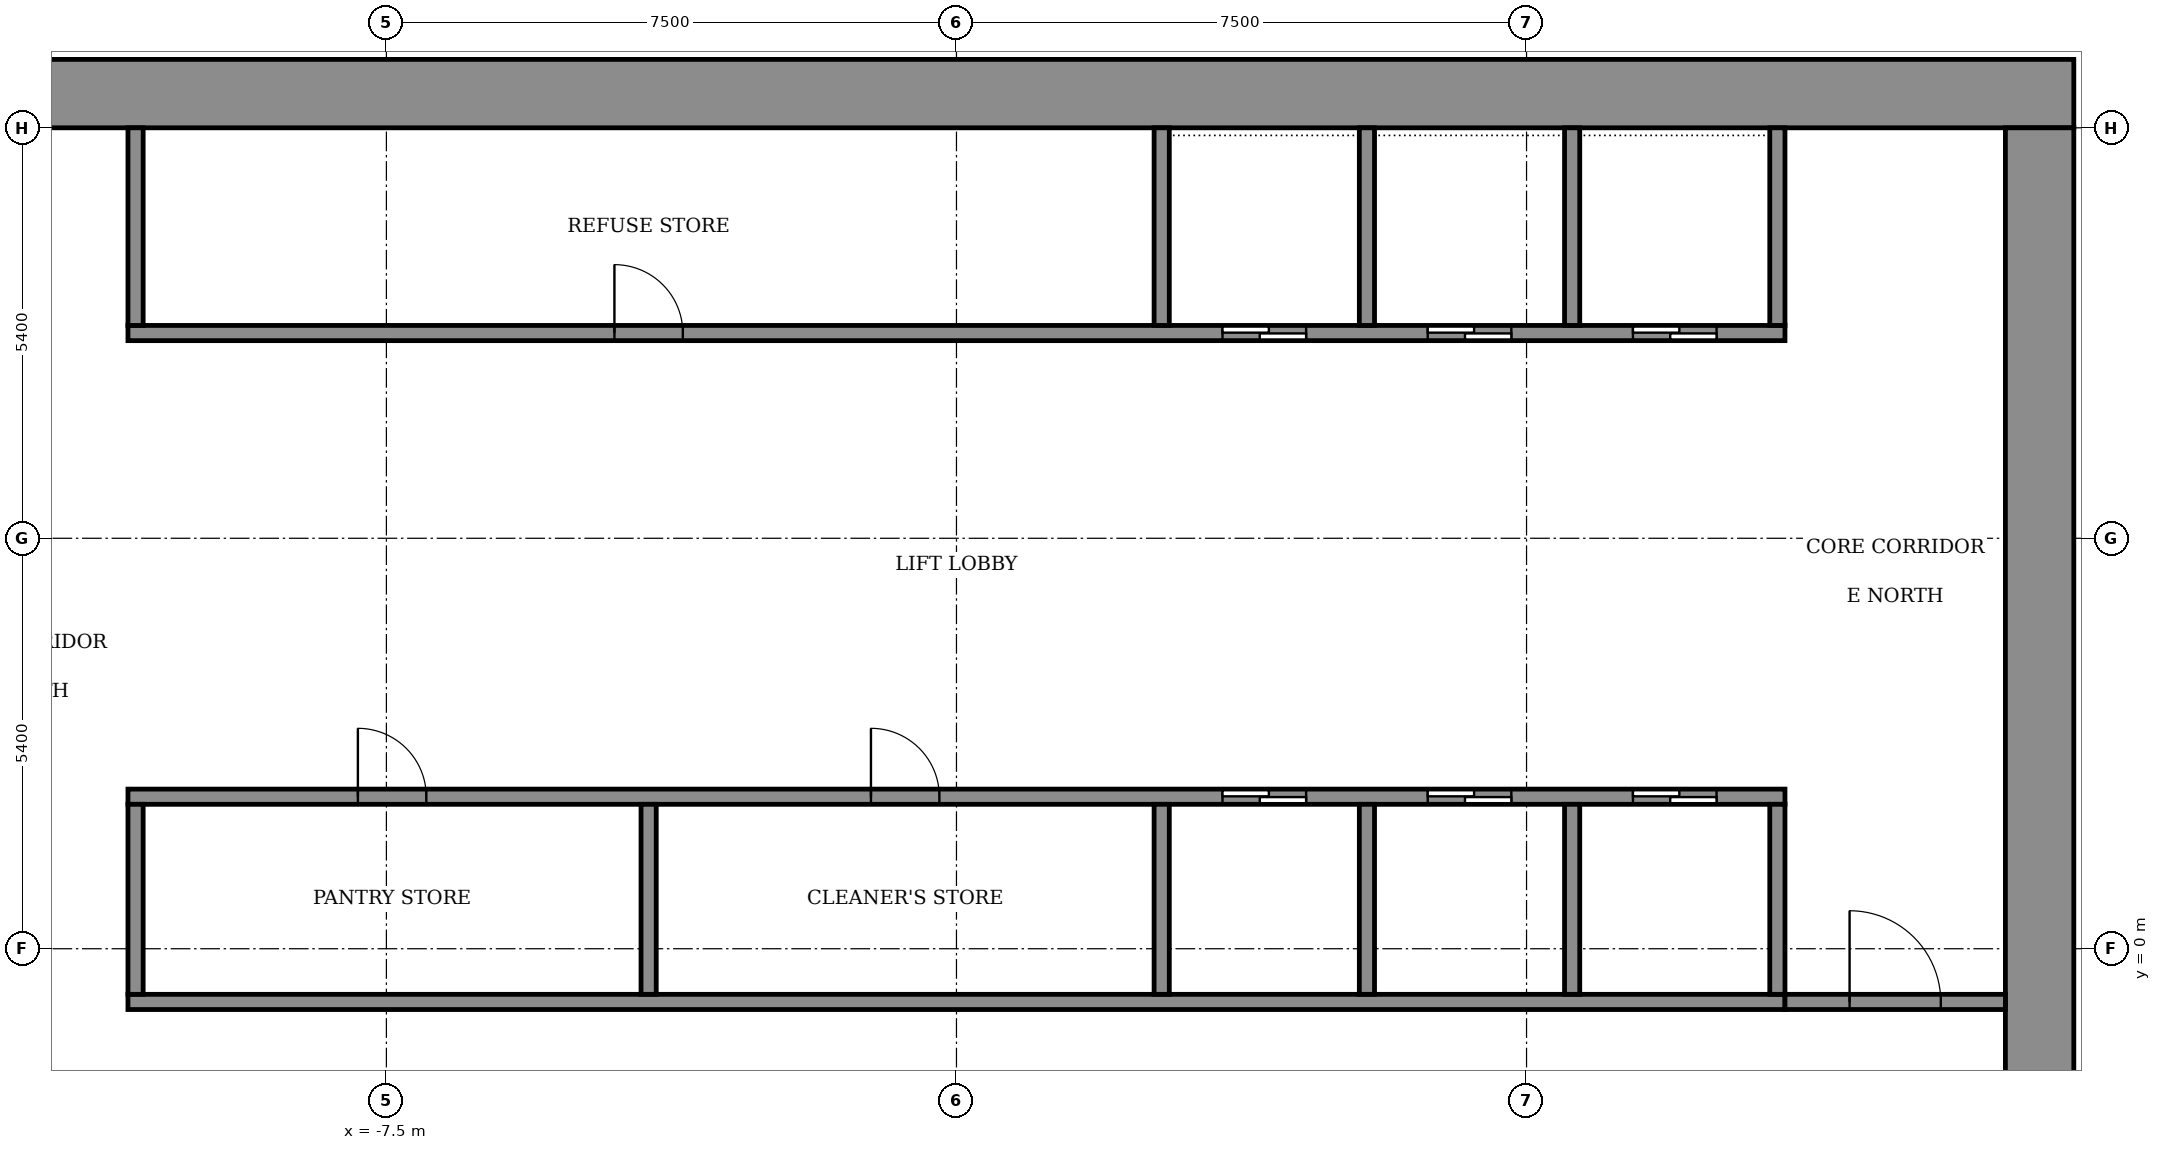
"""IFC4 building model, lengths in metres.
Left out: names, types, materials, properties, quantities, classifications, styles, units other than length and angle.
Written with IfcOpenShell. Run it as: python <this file> out.ifc"""

import sys

from ifc_helpers import new_model, si_unit, direction, frame, frame_2d, origin, place, context, subcontext, project, spatial, rectangle, extrude, element, fill, save


model = new_model("IFC4")
c1 = context("Model", 3, precision=1e-05, world=origin(), true_north=direction((0.0, 1.0)))
c2 = subcontext(c1, "Body", "Model", "MODEL_VIEW")
j1 = project(units=[si_unit("LENGTHUNIT", "METRE"), si_unit("PLANEANGLEUNIT", "RADIAN")], contexts=[c1])
p1 = place(None, origin())
s1 = spatial("IfcSite", under=j1, at=p1, CompositionType="ELEMENT")
p2 = place(p1, origin())
s2 = spatial("IfcBuilding", under=s1, at=p2, CompositionType="ELEMENT")
p3 = place(p2, frame((0.0, 0.0, 152.7)))
s3 = spatial("IfcBuildingStorey", under=s2, at=p3, CompositionType="ELEMENT", Elevation=152.7)
p4 = place(p3, frame((-14.7, 11.25, 0.0), z_axis=(0.0, 0.0, 1.0), x_axis=(1.0, 0.0, 0.0)))
e1 = element("IfcWall", 1, at=p4, inside=s3, PredefinedType="SHEAR", context=c2, shape_type="SweptSolid", body=[
    extrude(rectangle(XDim=29.4, YDim=0.9, at=frame_2d((14.7, 0.0))), origin(), (0.0, 0.0, 1.0), 3.6),
])
p5 = place(p3, frame((14.25, -10.8, 0.0), z_axis=(0.0, 0.0, 1.0), x_axis=(0.0, 1.0, 0.0)))
e2 = element("IfcWall", 2, at=p5, inside=s3, PredefinedType="SHEAR", context=c2, shape_type="SweptSolid", body=[
    extrude(rectangle(XDim=21.6, YDim=0.9, at=frame_2d((10.8, 0.0))), origin(), (0.0, 0.0, 1.0), 3.6),
])
p6 = place(p5, frame((1.2, 0.0, 0.0)))
e3 = element("IfcOpeningElement", 3, at=p6, cuts=e2, PredefinedType="OPENING", context=c2, shape_type="SweptSolid", body=[
    extrude(rectangle(XDim=1.2, YDim=2.1, at=frame_2d((0.6, 1.05))), frame((0.0, 0.46, 0.0), z_axis=(0.0, -1.0, 0.0), x_axis=(1.0, 0.0, 0.0)), (0.0, 0.0, 1.0), 0.92),
])
p7 = place(p3, frame((-10.9, -0.7, 0.0), z_axis=(0.0, 0.0, 1.0), x_axis=(1.0, 0.0, 0.0)))
e4 = element("IfcWall", 4, at=p7, inside=s3, PredefinedType="SHEAR", context=c2, shape_type="SweptSolid", body=[
    extrude(rectangle(XDim=21.8, YDim=0.2, at=frame_2d((10.9, 0.0))), origin(), (0.0, 0.0, 1.0), 3.05),
])
p8 = place(p3, frame((-10.9, 2.0, 0.0), z_axis=(0.0, 0.0, 1.0), x_axis=(1.0, 0.0, 0.0)))
e5 = element("IfcWall", 5, at=p8, inside=s3, PredefinedType="SHEAR", context=c2, shape_type="SweptSolid", body=[
    extrude(rectangle(XDim=21.8, YDim=0.2, at=frame_2d((10.9, 0.0))), origin(), (0.0, 0.0, 1.0), 3.05),
])
p9 = place(p8, frame((14.4, 0.0, 0.0)))
e6 = element("IfcOpeningElement", 6, at=p9, cuts=e5, PredefinedType="OPENING", context=c2, shape_type="SweptSolid", body=[
    extrude(rectangle(XDim=1.1, YDim=2.1, at=frame_2d((0.55, 1.05))), frame((0.0, 0.11, 0.0), z_axis=(0.0, -1.0, 0.0), x_axis=(1.0, 0.0, 0.0)), (0.0, 0.0, 1.0), 0.22),
])
p10 = place(p8, frame((17.1, 0.0, 0.0)))
e7 = element("IfcOpeningElement", 7, at=p10, cuts=e5, PredefinedType="OPENING", context=c2, shape_type="SweptSolid", body=[
    extrude(rectangle(XDim=1.1, YDim=2.1, at=frame_2d((0.55, 1.05))), frame((0.0, 0.11, 0.0), z_axis=(0.0, -1.0, 0.0), x_axis=(1.0, 0.0, 0.0)), (0.0, 0.0, 1.0), 0.22),
])
p11 = place(p8, frame((19.8, 0.0, 0.0)))
e8 = element("IfcOpeningElement", 8, at=p11, cuts=e5, PredefinedType="OPENING", context=c2, shape_type="SweptSolid", body=[
    extrude(rectangle(XDim=1.1, YDim=2.1, at=frame_2d((0.55, 1.05))), frame((0.0, 0.11, 0.0), z_axis=(0.0, -1.0, 0.0), x_axis=(1.0, 0.0, 0.0)), (0.0, 0.0, 1.0), 0.22),
])
p12 = place(p8, frame((3.025, 0.0, 0.0)))
e9 = element("IfcOpeningElement", 9, at=p12, cuts=e5, PredefinedType="OPENING", context=c2, shape_type="SweptSolid", body=[
    extrude(rectangle(XDim=0.9, YDim=2.1, at=frame_2d((0.45, 1.05))), frame((0.0, 0.11, 0.0), z_axis=(0.0, -1.0, 0.0), x_axis=(1.0, 0.0, 0.0)), (0.0, 0.0, 1.0), 0.22),
])
p13 = place(p8, frame((9.775, 0.0, 0.0)))
e10 = element("IfcOpeningElement", 10, at=p13, cuts=e5, PredefinedType="OPENING", context=c2, shape_type="SweptSolid", body=[
    extrude(rectangle(XDim=0.9, YDim=2.1, at=frame_2d((0.45, 1.05))), frame((0.0, 0.11, 0.0), z_axis=(0.0, -1.0, 0.0), x_axis=(1.0, 0.0, 0.0)), (0.0, 0.0, 1.0), 0.22),
])
p14 = place(p3, frame((-10.9, 8.1, 0.0), z_axis=(0.0, 0.0, 1.0), x_axis=(1.0, 0.0, 0.0)))
e11 = element("IfcWall", 11, at=p14, inside=s3, PredefinedType="SHEAR", context=c2, shape_type="SweptSolid", body=[
    extrude(rectangle(XDim=21.8, YDim=0.2, at=frame_2d((10.9, 0.0))), origin(), (0.0, 0.0, 1.0), 3.05),
])
p15 = place(p14, frame((14.4, 0.0, 0.0)))
e12 = element("IfcOpeningElement", 12, at=p15, cuts=e11, PredefinedType="OPENING", context=c2, shape_type="SweptSolid", body=[
    extrude(rectangle(XDim=1.1, YDim=2.1, at=frame_2d((0.55, 1.05))), frame((0.0, 0.11, 0.0), z_axis=(0.0, -1.0, 0.0), x_axis=(1.0, 0.0, 0.0)), (0.0, 0.0, 1.0), 0.22),
])
p16 = place(p14, frame((17.1, 0.0, 0.0)))
e13 = element("IfcOpeningElement", 13, at=p16, cuts=e11, PredefinedType="OPENING", context=c2, shape_type="SweptSolid", body=[
    extrude(rectangle(XDim=1.1, YDim=2.1, at=frame_2d((0.55, 1.05))), frame((0.0, 0.11, 0.0), z_axis=(0.0, -1.0, 0.0), x_axis=(1.0, 0.0, 0.0)), (0.0, 0.0, 1.0), 0.22),
])
p17 = place(p14, frame((19.8, 0.0, 0.0)))
e14 = element("IfcOpeningElement", 14, at=p17, cuts=e11, PredefinedType="OPENING", context=c2, shape_type="SweptSolid", body=[
    extrude(rectangle(XDim=1.1, YDim=2.1, at=frame_2d((0.55, 1.05))), frame((0.0, 0.11, 0.0), z_axis=(0.0, -1.0, 0.0), x_axis=(1.0, 0.0, 0.0)), (0.0, 0.0, 1.0), 0.22),
])
p18 = place(p14, frame((6.4, 0.0, 0.0)))
e15 = element("IfcOpeningElement", 15, at=p18, cuts=e11, PredefinedType="OPENING", context=c2, shape_type="SweptSolid", body=[
    extrude(rectangle(XDim=0.9, YDim=2.1, at=frame_2d((0.45, 1.05))), frame((0.0, 0.11, 0.0), z_axis=(0.0, -1.0, 0.0), x_axis=(1.0, 0.0, 0.0)), (0.0, 0.0, 1.0), 0.22),
])
for number, where, z_axis, x_axis in (
    (16, (-10.8, -0.6, 0.0), (0.0, 0.0, 1.0), (0.0, 1.0, 0.0)),
    (17, (-4.05, -0.6, 0.0), (0.0, 0.0, 1.0), (0.0, 1.0, 0.0)),
):
    element("IfcWall", number, at=place(p3, frame(where, z_axis=z_axis, x_axis=x_axis)), inside=s3, PredefinedType="STANDARD", context=c2, shape_type="SweptSolid", body=[
        extrude(rectangle(XDim=2.5, YDim=0.2, at=frame_2d((1.25, 0.0))), origin(), (0.0, 0.0, 1.0), 3.05),
    ])
for number, where, z_axis, x_axis in (
    (18, (2.7, -0.6, 0.0), (0.0, 0.0, 1.0), (0.0, 1.0, 0.0)),
    (19, (5.4, -0.6, 0.0), (0.0, 0.0, 1.0), (0.0, 1.0, 0.0)),
    (20, (8.1, -0.6, 0.0), (0.0, 0.0, 1.0), (0.0, 1.0, 0.0)),
    (21, (10.8, -0.6, 0.0), (0.0, 0.0, 1.0), (0.0, 1.0, 0.0)),
):
    element("IfcWall", number, at=place(p3, frame(where, z_axis=z_axis, x_axis=x_axis)), inside=s3, PredefinedType="SHEAR", context=c2, shape_type="SweptSolid", body=[
        extrude(rectangle(XDim=2.5, YDim=0.2, at=frame_2d((1.25, 0.0))), origin(), (0.0, 0.0, 1.0), 3.05),
    ])
p19 = place(p3, frame((-10.8, 8.2, 0.0), z_axis=(0.0, 0.0, 1.0), x_axis=(0.0, 1.0, 0.0)))
e22 = element("IfcWall", 22, at=p19, inside=s3, PredefinedType="STANDARD", context=c2, shape_type="SweptSolid", body=[
    extrude(rectangle(XDim=2.6, YDim=0.2, at=frame_2d((1.3, 0.0))), origin(), (0.0, 0.0, 1.0), 3.05),
])
for number, where, z_axis, x_axis in (
    (23, (2.7, 8.2, 0.0), (0.0, 0.0, 1.0), (0.0, 1.0, 0.0)),
    (24, (5.4, 8.2, 0.0), (0.0, 0.0, 1.0), (0.0, 1.0, 0.0)),
    (25, (8.1, 8.2, 0.0), (0.0, 0.0, 1.0), (0.0, 1.0, 0.0)),
    (26, (10.8, 8.2, 0.0), (0.0, 0.0, 1.0), (0.0, 1.0, 0.0)),
):
    element("IfcWall", number, at=place(p3, frame(where, z_axis=z_axis, x_axis=x_axis)), inside=s3, PredefinedType="SHEAR", context=c2, shape_type="SweptSolid", body=[
        extrude(rectangle(XDim=2.6, YDim=0.2, at=frame_2d((1.3, 0.0))), origin(), (0.0, 0.0, 1.0), 3.05),
    ])
p20 = place(p3, frame((10.9, -0.7, 0.0), z_axis=(0.0, 0.0, 1.0), x_axis=(1.0, 0.0, 0.0)))
e27 = element("IfcWall", 27, at=p20, inside=s3, PredefinedType="STANDARD", context=c2, shape_type="SweptSolid", body=[
    extrude(rectangle(XDim=2.9, YDim=0.2, at=frame_2d((1.45, 0.0))), origin(), (0.0, 0.0, 1.0), 3.05),
])
p21 = place(p20, frame((0.85, 0.0, 0.0)))
e28 = element("IfcOpeningElement", 28, at=p21, cuts=e27, PredefinedType="OPENING", context=c2, shape_type="SweptSolid", body=[
    extrude(rectangle(XDim=1.2, YDim=2.1, at=frame_2d((0.6, 1.05))), frame((0.0, 0.11, 0.0), z_axis=(0.0, -1.0, 0.0), x_axis=(1.0, 0.0, 0.0)), (0.0, 0.0, 1.0), 0.22),
])
p22 = place(p9, origin())
e29 = element("IfcDoor", 29, at=p22, inside=s3, OperationType="SLIDING_TO_LEFT", PredefinedType="DOOR", context=c2, shape_type="SweptSolid", body=[
    extrude(rectangle(XDim=1.1, YDim=2.1, at=frame_2d((0.55, 1.05))), frame((0.0, 0.025, 0.0), z_axis=(0.0, -1.0, 0.0), x_axis=(1.0, 0.0, 0.0)), (0.0, 0.0, 1.0), 0.05),
])
fill(e6, e29)
p23 = place(p10, origin())
e30 = element("IfcDoor", 30, at=p23, inside=s3, OperationType="SLIDING_TO_LEFT", PredefinedType="DOOR", context=c2, shape_type="SweptSolid", body=[
    extrude(rectangle(XDim=1.1, YDim=2.1, at=frame_2d((0.55, 1.05))), frame((0.0, 0.025, 0.0), z_axis=(0.0, -1.0, 0.0), x_axis=(1.0, 0.0, 0.0)), (0.0, 0.0, 1.0), 0.05),
])
fill(e7, e30)
p24 = place(p11, origin())
e31 = element("IfcDoor", 31, at=p24, inside=s3, OperationType="SLIDING_TO_LEFT", PredefinedType="DOOR", context=c2, shape_type="SweptSolid", body=[
    extrude(rectangle(XDim=1.1, YDim=2.1, at=frame_2d((0.55, 1.05))), frame((0.0, 0.025, 0.0), z_axis=(0.0, -1.0, 0.0), x_axis=(1.0, 0.0, 0.0)), (0.0, 0.0, 1.0), 0.05),
])
fill(e8, e31)
p25 = place(p15, origin())
e32 = element("IfcDoor", 32, at=p25, inside=s3, OperationType="SLIDING_TO_LEFT", PredefinedType="DOOR", context=c2, shape_type="SweptSolid", body=[
    extrude(rectangle(XDim=1.1, YDim=2.1, at=frame_2d((0.55, 1.05))), frame((0.0, 0.025, 0.0), z_axis=(0.0, -1.0, 0.0), x_axis=(1.0, 0.0, 0.0)), (0.0, 0.0, 1.0), 0.05),
])
fill(e12, e32)
p26 = place(p16, origin())
e33 = element("IfcDoor", 33, at=p26, inside=s3, OperationType="SLIDING_TO_LEFT", PredefinedType="DOOR", context=c2, shape_type="SweptSolid", body=[
    extrude(rectangle(XDim=1.1, YDim=2.1, at=frame_2d((0.55, 1.05))), frame((0.0, 0.025, 0.0), z_axis=(0.0, -1.0, 0.0), x_axis=(1.0, 0.0, 0.0)), (0.0, 0.0, 1.0), 0.05),
])
fill(e13, e33)
p27 = place(p17, origin())
e34 = element("IfcDoor", 34, at=p27, inside=s3, OperationType="SLIDING_TO_LEFT", PredefinedType="DOOR", context=c2, shape_type="SweptSolid", body=[
    extrude(rectangle(XDim=1.1, YDim=2.1, at=frame_2d((0.55, 1.05))), frame((0.0, 0.025, 0.0), z_axis=(0.0, -1.0, 0.0), x_axis=(1.0, 0.0, 0.0)), (0.0, 0.0, 1.0), 0.05),
])
fill(e14, e34)
p28 = place(p12, origin())
e35 = element("IfcDoor", 35, at=p28, inside=s3, OperationType="SINGLE_SWING_RIGHT", PredefinedType="DOOR", context=c2, shape_type="SweptSolid", body=[
    extrude(rectangle(XDim=0.9, YDim=2.1, at=frame_2d((0.45, 1.05))), frame((0.0, 0.025, 0.0), z_axis=(0.0, -1.0, 0.0), x_axis=(1.0, 0.0, 0.0)), (0.0, 0.0, 1.0), 0.05),
])
fill(e9, e35)
p29 = place(p13, origin())
e36 = element("IfcDoor", 36, at=p29, inside=s3, OperationType="SINGLE_SWING_RIGHT", PredefinedType="DOOR", context=c2, shape_type="SweptSolid", body=[
    extrude(rectangle(XDim=0.9, YDim=2.1, at=frame_2d((0.45, 1.05))), frame((0.0, 0.025, 0.0), z_axis=(0.0, -1.0, 0.0), x_axis=(1.0, 0.0, 0.0)), (0.0, 0.0, 1.0), 0.05),
])
fill(e10, e36)
p30 = place(p18, origin())
e37 = element("IfcDoor", 37, at=p30, inside=s3, OperationType="SINGLE_SWING_RIGHT", PredefinedType="DOOR", context=c2, shape_type="SweptSolid", body=[
    extrude(rectangle(XDim=0.9, YDim=2.1, at=frame_2d((0.45, 1.05))), frame((0.0, 0.025, 0.0), z_axis=(0.0, -1.0, 0.0), x_axis=(1.0, 0.0, 0.0)), (0.0, 0.0, 1.0), 0.05),
])
fill(e15, e37)
p31 = place(p21, origin())
e38 = element("IfcDoor", 38, at=p31, inside=s3, OperationType="SINGLE_SWING_LEFT", PredefinedType="DOOR", context=c2, shape_type="SweptSolid", body=[
    extrude(rectangle(XDim=1.2, YDim=2.1, at=frame_2d((0.6, 1.05))), frame((0.0, 0.025, 0.0), z_axis=(0.0, -1.0, 0.0), x_axis=(1.0, 0.0, 0.0)), (0.0, 0.0, 1.0), 0.05),
])
fill(e28, e38)
save(model, sys.argv[1])
